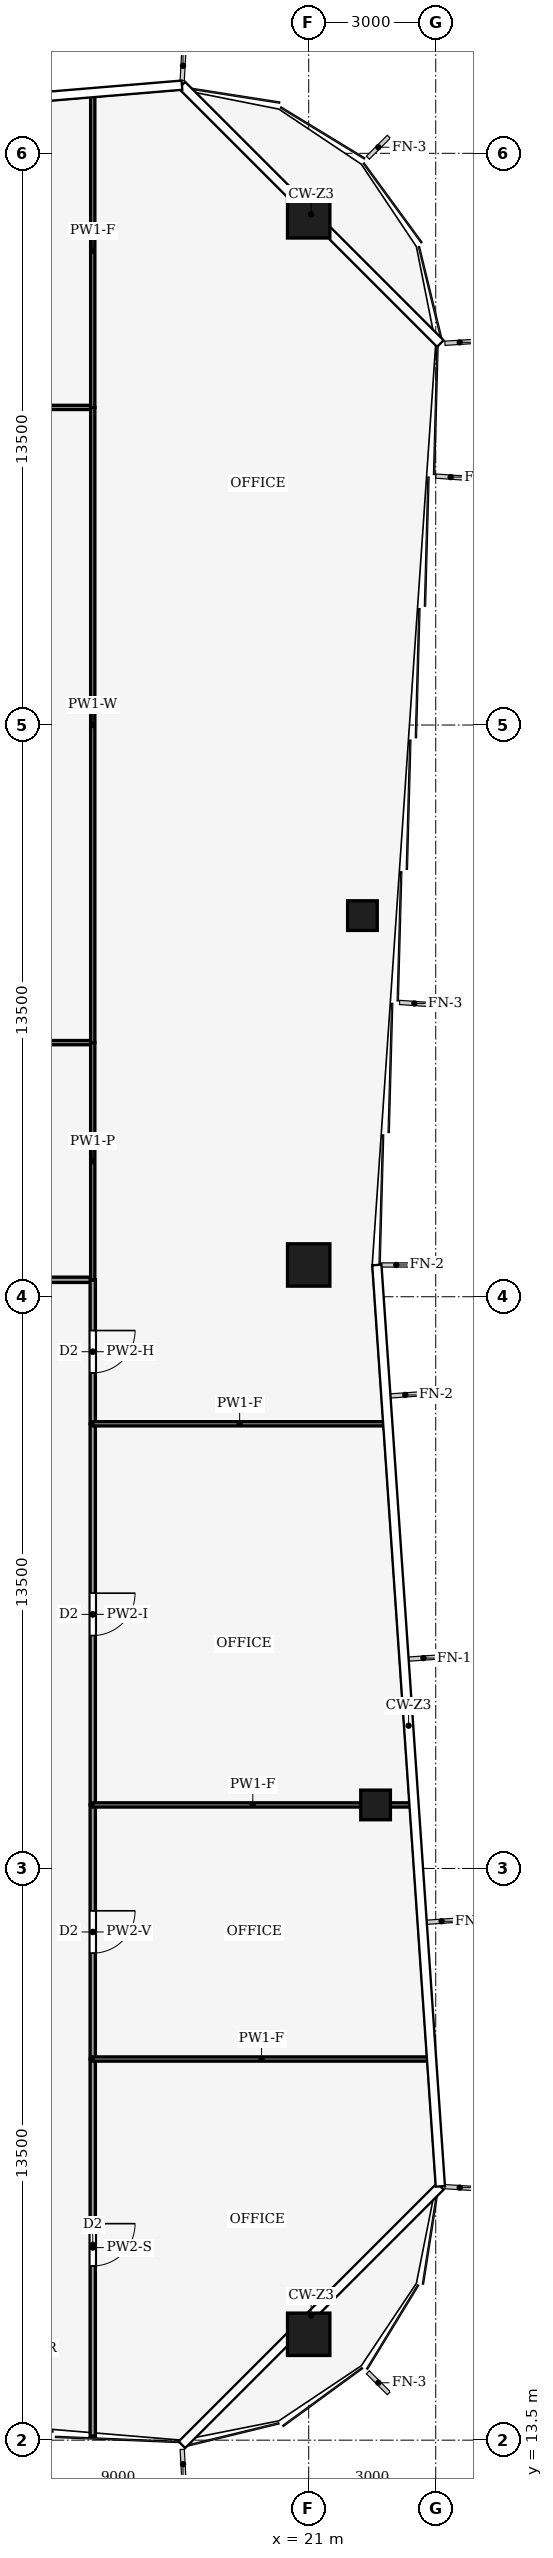
"""IFC4 building model, lengths in metres.
Left out: names, types, materials, properties, quantities, classifications, styles, units other than length and angle.
Written with IfcOpenShell. Run it as: python <this file> out.ifc"""

import sys

from ifc_helpers import new_model, si_unit, direction, frame, frame_2d, origin, origin_2d, place, context, subcontext, project, spatial, rectangle, hollow_rectangle, extrude, element, fill, save


model = new_model("IFC4")
c1 = context("Model", 3, precision=1e-05, world=origin(), true_north=direction((0.0, 1.0)))
c2 = subcontext(c1, "Body", "Model", "MODEL_VIEW")
j1 = project(units=[si_unit("LENGTHUNIT", "METRE"), si_unit("PLANEANGLEUNIT", "RADIAN")], contexts=[c1])
p1 = place(None, origin())
s1 = spatial("IfcSite", under=j1, at=p1, CompositionType="ELEMENT")
p2 = place(p1, origin())
s2 = spatial("IfcBuilding", under=s1, at=p2, CompositionType="ELEMENT")
p3 = place(p2, frame((0.0, 0.0, 194.0)))
s3 = spatial("IfcBuildingStorey", under=s2, at=p3, CompositionType="ELEMENT", Elevation=194.0)
for number, where, z_axis, x_axis in (
    (1, (21.0, 66.0, 0.0), (0.0, 0.0, 1.0), (1.0, 0.0, 0.0)),
    (2, (21.0, 41.25, 0.0), (0.0, 0.0, 1.0), (1.0, 0.0, 0.0)),
    (3, (21.0, 16.0, 0.0), (0.0, 0.0, 1.0), (1.0, 0.0, 0.0)),
):
    element("IfcColumn", number, at=place(p3, frame(where, z_axis=z_axis, x_axis=x_axis)), inside=s3, PredefinedType="COLUMN", context=c2, shape_type="SweptSolid", body=[
        extrude(hollow_rectangle(XDim=1.0, YDim=1.0, WallThickness=0.06, at=origin_2d()), origin(), (0.0, 0.0, 1.0), 4.0),
    ])
for number, where, z_axis, x_axis in (
    (4, (22.579, 28.5, 0.0), (0.0, 0.0, 1.0), (1.0, 0.0, 0.0)),
    (5, (22.269, 49.5, 0.0), (0.0, 0.0, 1.0), (1.0, 0.0, 0.0)),
):
    element("IfcColumn", number, at=place(p3, frame(where, z_axis=z_axis, x_axis=x_axis)), inside=s3, PredefinedType="COLUMN", context=c2, shape_type="SweptSolid", body=[
        extrude(hollow_rectangle(XDim=0.7, YDim=0.7, WallThickness=0.03, at=origin_2d()), origin(), (0.0, 0.0, 1.0), 4.0),
    ])
p4 = place(p3, frame((9.0, 40.9, 0.0), z_axis=(0.0, 0.0, 1.0), x_axis=(1.0, 0.0, 0.0)))
e6 = element("IfcWall", 6, at=p4, inside=s3, PredefinedType="PARTITIONING", context=c2, shape_type="SweptSolid", body=[
    extrude(rectangle(XDim=6.9, YDim=0.125, at=frame_2d((3.45, 0.0))), origin(), (0.0, 0.0, 1.0), 3.44),
])
p5 = place(p4, frame((2.95, 0.0, 0.0)))
e7 = element("IfcOpeningElement", 7, at=p5, cuts=e6, PredefinedType="OPENING", context=c2, shape_type="SweptSolid", body=[
    extrude(rectangle(XDim=1.0, YDim=2.1, at=frame_2d((0.5, 1.05))), frame((0.0, 0.073, 0.0), z_axis=(0.0, -1.0, 0.0), x_axis=(1.0, 0.0, 0.0)), (0.0, 0.0, 1.0), 0.145),
])
p6 = place(p3, frame((15.9, 22.5, 0.0), z_axis=(0.0, 0.0, 1.0), x_axis=(0.0, -1.0, 0.0)))
e8 = element("IfcWall", 8, at=p6, inside=s3, PredefinedType="PARTITIONING", context=c2, shape_type="SweptSolid", body=[
    extrude(rectangle(XDim=8.905, YDim=0.125, at=frame_2d((4.453, 0.0))), origin(), (0.0, 0.0, 1.0), 3.04),
])
p7 = place(p6, frame((3.887, 0.0, 0.0)))
e9 = element("IfcOpeningElement", 9, at=p7, cuts=e8, PredefinedType="OPENING", context=c2, shape_type="SweptSolid", body=[
    extrude(rectangle(XDim=1.0, YDim=2.1, at=frame_2d((0.5, 1.05))), frame((0.0, 0.073, 0.0), z_axis=(0.0, -1.0, 0.0), x_axis=(1.0, 0.0, 0.0)), (0.0, 0.0, 1.0), 0.145),
])
p8 = place(p3, frame((15.9, 28.5, 0.0), z_axis=(0.0, 0.0, 1.0), x_axis=(0.0, -1.0, 0.0)))
e10 = element("IfcWall", 10, at=p8, inside=s3, PredefinedType="PARTITIONING", context=c2, shape_type="SweptSolid", body=[
    extrude(rectangle(XDim=6.0, YDim=0.125, at=frame_2d((3.0, 0.0))), origin(), (0.0, 0.0, 1.0), 3.44),
])
p9 = place(p8, frame((2.5, 0.0, 0.0)))
e11 = element("IfcOpeningElement", 11, at=p9, cuts=e10, PredefinedType="OPENING", context=c2, shape_type="SweptSolid", body=[
    extrude(rectangle(XDim=1.0, YDim=2.1, at=frame_2d((0.5, 1.05))), frame((0.0, 0.073, 0.0), z_axis=(0.0, -1.0, 0.0), x_axis=(1.0, 0.0, 0.0)), (0.0, 0.0, 1.0), 0.145),
])
p10 = place(p3, frame((15.9, 37.5, 0.0), z_axis=(0.0, 0.0, 1.0), x_axis=(0.0, -1.0, 0.0)))
e12 = element("IfcWall", 12, at=p10, inside=s3, PredefinedType="PARTITIONING", context=c2, shape_type="SweptSolid", body=[
    extrude(rectangle(XDim=9.0, YDim=0.125, at=frame_2d((4.5, 0.0))), origin(), (0.0, 0.0, 1.0), 3.48),
])
p11 = place(p10, frame((4.0, 0.0, 0.0)))
e13 = element("IfcOpeningElement", 13, at=p11, cuts=e12, PredefinedType="OPENING", context=c2, shape_type="SweptSolid", body=[
    extrude(rectangle(XDim=1.0, YDim=2.1, at=frame_2d((0.5, 1.05))), frame((0.0, 0.073, 0.0), z_axis=(0.0, -1.0, 0.0), x_axis=(1.0, 0.0, 0.0)), (0.0, 0.0, 1.0), 0.145),
])
p12 = place(p3, frame((15.9, 40.904, 0.0), z_axis=(0.0, 0.0, 1.0), x_axis=(0.0, -1.0, 0.0)))
e14 = element("IfcWall", 14, at=p12, inside=s3, PredefinedType="PARTITIONING", context=c2, shape_type="SweptSolid", body=[
    extrude(rectangle(XDim=3.404, YDim=0.125, at=frame_2d((1.702, 0.0))), origin(), (0.0, 0.0, 1.0), 3.14),
])
p13 = place(p12, frame((1.202, 0.0, 0.0)))
e15 = element("IfcOpeningElement", 15, at=p13, cuts=e14, PredefinedType="OPENING", context=c2, shape_type="SweptSolid", body=[
    extrude(rectangle(XDim=1.0, YDim=2.1, at=frame_2d((0.5, 1.05))), frame((0.0, 0.073, 0.0), z_axis=(0.0, -1.0, 0.0), x_axis=(1.0, 0.0, 0.0)), (0.0, 0.0, 1.0), 0.145),
])
p14 = place(p3, frame((15.9, 46.5, 0.0), z_axis=(0.0, 0.0, 1.0), x_axis=(-1.0, 0.0, 0.0)))
e16 = element("IfcWall", 16, at=p14, inside=s3, PredefinedType="PARTITIONING", context=c2, shape_type="SweptSolid", body=[
    extrude(rectangle(XDim=6.904, YDim=0.1, at=frame_2d((3.452, 0.0))), origin(), (0.0, 0.0, 1.0), 3.44),
])
p15 = place(p3, frame((15.9, 40.896, 0.0), z_axis=(0.0, 0.0, 1.0), x_axis=(0.0, 1.0, 0.0)))
e17 = element("IfcWall", 17, at=p15, inside=s3, PredefinedType="PARTITIONING", context=c2, shape_type="SweptSolid", body=[
    extrude(rectangle(XDim=5.608, YDim=0.1, at=frame_2d((2.804, 0.0))), origin(), (0.0, 0.0, 1.0), 3.44),
])
p16 = place(p3, frame((9.0, 61.5, 0.0), z_axis=(0.0, 0.0, 1.0), x_axis=(1.0, 0.0, 0.0)))
e18 = element("IfcWall", 18, at=p16, inside=s3, PredefinedType="PARTITIONING", context=c2, shape_type="SweptSolid", body=[
    extrude(rectangle(XDim=6.9, YDim=0.1, at=frame_2d((3.45, 0.0))), origin(), (0.0, 0.0, 1.0), 3.24),
])
p17 = place(p16, frame((2.95, 0.0, 0.0)))
e19 = element("IfcOpeningElement", 19, at=p17, cuts=e18, PredefinedType="OPENING", context=c2, shape_type="SweptSolid", body=[
    extrude(rectangle(XDim=1.0, YDim=2.1, at=frame_2d((0.5, 1.05))), frame((0.0, 0.06, 0.0), z_axis=(0.0, -1.0, 0.0), x_axis=(1.0, 0.0, 0.0)), (0.0, 0.0, 1.0), 0.12),
])
p18 = place(p3, frame((15.9, 46.496, 0.0), z_axis=(0.0, 0.0, 1.0), x_axis=(0.0, 1.0, 0.0)))
e20 = element("IfcWall", 20, at=p18, inside=s3, PredefinedType="PARTITIONING", context=c2, shape_type="SweptSolid", body=[
    extrude(rectangle(XDim=15.008, YDim=0.1, at=frame_2d((7.504, 0.0))), origin(), (0.0, 0.0, 1.0), 3.24),
])
p19 = place(p3, frame((15.9, 61.496, 0.0), z_axis=(0.0, 0.0, 1.0), x_axis=(0.0, 1.0, 0.0)))
e21 = element("IfcWall", 21, at=p19, inside=s3, PredefinedType="PARTITIONING", context=c2, shape_type="SweptSolid", body=[
    extrude(rectangle(XDim=7.409, YDim=0.1, at=frame_2d((3.705, 0.0))), origin(), (0.0, 0.0, 1.0), 3.04),
])
p20 = place(p3, frame((23.873, 22.5, 0.0), z_axis=(0.0, 0.0, 1.0), x_axis=(-1.0, 0.0, 0.0)))
e22 = element("IfcWall", 22, at=p20, inside=s3, PredefinedType="PARTITIONING", context=c2, shape_type="SweptSolid", body=[
    extrude(rectangle(XDim=7.973, YDim=0.1, at=frame_2d((3.987, 0.0))), origin(), (0.0, 0.0, 1.0), 3.04),
])
p21 = place(p3, frame((23.459, 28.5, 0.0), z_axis=(0.0, 0.0, 1.0), x_axis=(-1.0, 0.0, 0.0)))
e23 = element("IfcWall", 23, at=p21, inside=s3, PredefinedType="PARTITIONING", context=c2, shape_type="SweptSolid", body=[
    extrude(rectangle(XDim=7.559, YDim=0.1, at=frame_2d((3.78, 0.0))), origin(), (0.0, 0.0, 1.0), 3.04),
])
p22 = place(p3, frame((22.839, 37.5, 0.0), z_axis=(0.0, 0.0, 1.0), x_axis=(-1.0, 0.0, 0.0)))
e24 = element("IfcWall", 24, at=p22, inside=s3, PredefinedType="PARTITIONING", context=c2, shape_type="SweptSolid", body=[
    extrude(rectangle(XDim=6.939, YDim=0.1, at=frame_2d((3.469, 0.0))), origin(), (0.0, 0.0, 1.0), 3.04),
])
p23 = place(p7, origin())
e25 = element("IfcDoor", 25, at=p23, inside=s3, OperationType="SINGLE_SWING_LEFT", PredefinedType="DOOR", context=c2, shape_type="SweptSolid", body=[
    extrude(rectangle(XDim=1.0, YDim=2.1, at=frame_2d((0.5, 1.05))), frame((0.0, 0.025, 0.0), z_axis=(0.0, -1.0, 0.0), x_axis=(1.0, 0.0, 0.0)), (0.0, 0.0, 1.0), 0.05),
])
fill(e9, e25)
p24 = place(p9, origin())
e26 = element("IfcDoor", 26, at=p24, inside=s3, OperationType="SINGLE_SWING_LEFT", PredefinedType="DOOR", context=c2, shape_type="SweptSolid", body=[
    extrude(rectangle(XDim=1.0, YDim=2.1, at=frame_2d((0.5, 1.05))), frame((0.0, 0.025, 0.0), z_axis=(0.0, -1.0, 0.0), x_axis=(1.0, 0.0, 0.0)), (0.0, 0.0, 1.0), 0.05),
])
fill(e11, e26)
p25 = place(p11, origin())
e27 = element("IfcDoor", 27, at=p25, inside=s3, OperationType="SINGLE_SWING_RIGHT", PredefinedType="DOOR", context=c2, shape_type="SweptSolid", body=[
    extrude(rectangle(XDim=1.0, YDim=2.1, at=frame_2d((0.5, 1.05))), frame((0.0, 0.025, 0.0), z_axis=(0.0, -1.0, 0.0), x_axis=(1.0, 0.0, 0.0)), (0.0, 0.0, 1.0), 0.05),
])
fill(e13, e27)
p26 = place(p13, origin())
e28 = element("IfcDoor", 28, at=p26, inside=s3, OperationType="SINGLE_SWING_LEFT", PredefinedType="DOOR", context=c2, shape_type="SweptSolid", body=[
    extrude(rectangle(XDim=1.0, YDim=2.1, at=frame_2d((0.5, 1.05))), frame((0.0, 0.025, 0.0), z_axis=(0.0, -1.0, 0.0), x_axis=(1.0, 0.0, 0.0)), (0.0, 0.0, 1.0), 0.05),
])
fill(e15, e28)
save(model, sys.argv[1])
